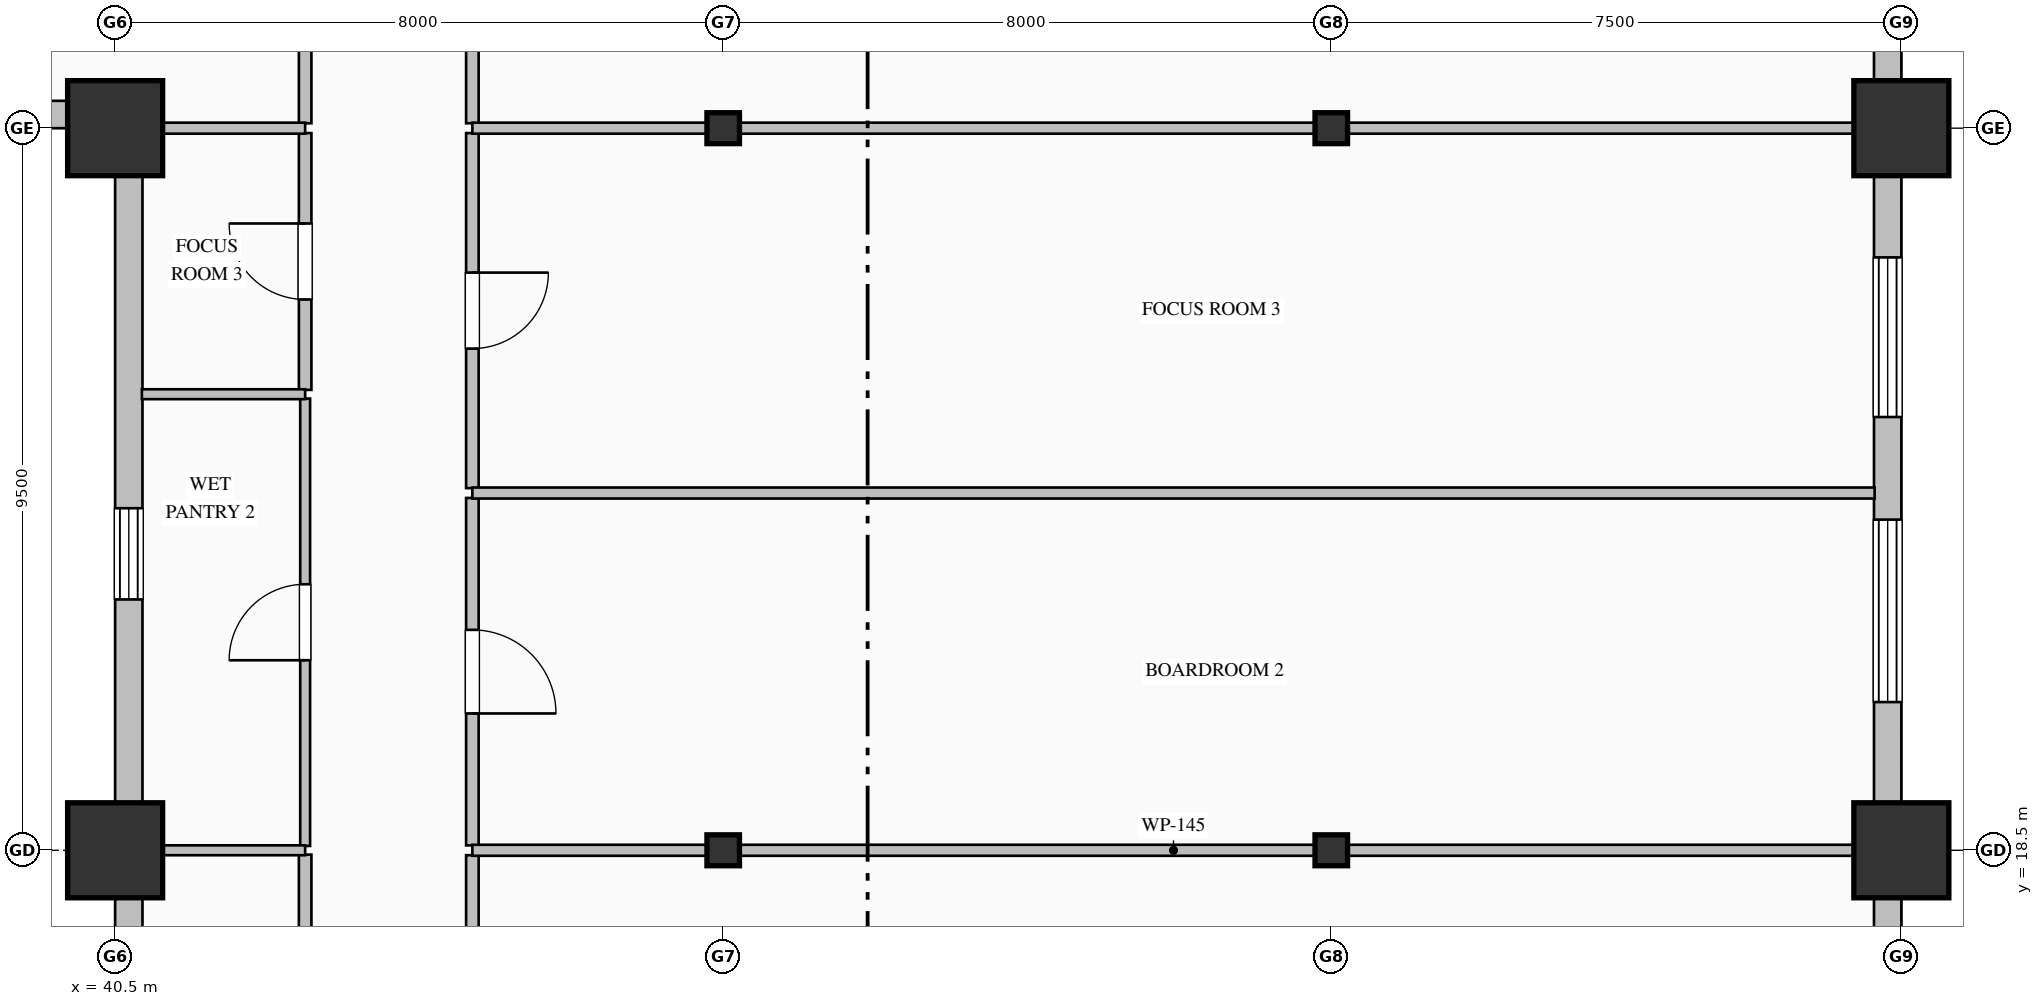
"""IFC4 building model, lengths in metres.
Left out: names, types, materials, properties, quantities, classifications, styles, units other than length and angle.
Written with IfcOpenShell. Run it as: python <this file> out.ifc"""

import sys

from ifc_helpers import new_model, si_unit, direction, frame, frame_2d, origin, origin_2d, place, context, subcontext, project, spatial, rectangle, hollow_rectangle, i_section, extrude, element, fill, save


model = new_model("IFC4")
c1 = context("Model", 3, precision=1e-05, world=origin(), true_north=direction((0.0, 1.0)))
c2 = subcontext(c1, "Body", "Model", "MODEL_VIEW")
j1 = project(units=[si_unit("LENGTHUNIT", "METRE"), si_unit("PLANEANGLEUNIT", "RADIAN")], contexts=[c1])
p1 = place(None, origin())
s1 = spatial("IfcSite", under=j1, at=p1, CompositionType="ELEMENT")
p2 = place(p1, origin())
s2 = spatial("IfcBuilding", under=s1, at=p2, CompositionType="ELEMENT")
p3 = place(p2, frame((0.0, 0.0, 36.2)))
s3 = spatial("IfcBuildingStorey", under=s2, at=p3, CompositionType="ELEMENT", Elevation=36.2)
for number, where, z_axis, x_axis in (
    (1, (40.5, 18.5, 0.0), (0.0, 0.0, 1.0), (1.0, 0.0, 0.0)),
    (2, (40.5, 28.0, 0.0), (0.0, 0.0, 1.0), (1.0, 0.0, 0.0)),
):
    element("IfcColumn", number, at=place(p3, frame(where, z_axis=z_axis, x_axis=x_axis)), inside=s3, PredefinedType="COLUMN", context=c2, shape_type="SweptSolid", body=[
        extrude(hollow_rectangle(XDim=1.25, YDim=1.25, WallThickness=0.045, at=origin_2d()), origin(), (0.0, 0.0, 1.0), 4.0),
    ])
for number, where, z_axis, x_axis in (
    (3, (48.5, 18.5, 0.0), (0.0, 0.0, 1.0), (1.0, 0.0, 0.0)),
    (4, (48.5, 28.0, 0.0), (0.0, 0.0, 1.0), (1.0, 0.0, 0.0)),
    (5, (56.5, 18.5, 0.0), (0.0, 0.0, 1.0), (1.0, 0.0, 0.0)),
    (6, (56.5, 28.0, 0.0), (0.0, 0.0, 1.0), (1.0, 0.0, 0.0)),
):
    element("IfcColumn", number, at=place(p3, frame(where, z_axis=z_axis, x_axis=x_axis)), inside=s3, PredefinedType="COLUMN", context=c2, shape_type="SweptSolid", body=[
        extrude(i_section(OverallWidth=0.407, OverallDepth=0.428, WebThickness=0.02, FlangeThickness=0.035, FilletRadius=0.022, at=origin_2d()), origin(), (0.0, 0.0, 1.0), 4.0),
    ])
for number, where, z_axis, x_axis in (
    (7, (64.0, 18.5, 0.0), (0.0, 0.0, 1.0), (1.0, 0.0, 0.0)),
    (8, (64.0, 28.0, 0.0), (0.0, 0.0, 1.0), (1.0, 0.0, 0.0)),
):
    element("IfcColumn", number, at=place(p3, frame(where, z_axis=z_axis, x_axis=x_axis)), inside=s3, PredefinedType="COLUMN", context=c2, shape_type="SweptSolid", body=[
        extrude(hollow_rectangle(XDim=1.25, YDim=1.25, WallThickness=0.045, at=origin_2d()), origin(), (0.0, 0.0, 1.0), 4.0),
    ])
p4 = place(p3, frame((40.68, 8.0, 0.0), z_axis=(0.0, 0.0, 1.0), x_axis=(0.0, 1.0, 0.0)))
e9 = element("IfcWall", 9, at=p4, inside=s3, PredefinedType="SOLIDWALL", context=c2, shape_type="SweptSolid", body=[
    extrude(rectangle(XDim=20.36, YDim=0.36, at=frame_2d((10.18, 0.0))), origin(), (0.0, 0.0, 1.0), 3.05),
])
p5 = place(p4, frame((6.6, 0.0, 0.7)))
e10 = element("IfcOpeningElement", 10, at=p5, cuts=e9, PredefinedType="OPENING", context=c2, shape_type="SweptSolid", body=[
    extrude(rectangle(XDim=1.2, YDim=1.85, at=frame_2d((0.6, 0.925))), frame((0.0, 0.19, 0.0), z_axis=(0.0, -1.0, 0.0), x_axis=(1.0, 0.0, 0.0)), (0.0, 0.0, 1.0), 0.38),
])
p6 = place(p4, frame((13.8, 0.0, 0.7)))
e11 = element("IfcOpeningElement", 11, at=p6, cuts=e9, PredefinedType="OPENING", context=c2, shape_type="SweptSolid", body=[
    extrude(rectangle(XDim=1.2, YDim=1.85, at=frame_2d((0.6, 0.925))), frame((0.0, 0.19, 0.0), z_axis=(0.0, -1.0, 0.0), x_axis=(1.0, 0.0, 0.0)), (0.0, 0.0, 1.0), 0.38),
])
p7 = place(p3, frame((40.52, 28.18, 0.0), z_axis=(0.0, 0.0, 1.0), x_axis=(-1.0, 0.0, 0.0)))
e12 = element("IfcWall", 12, at=p7, inside=s3, PredefinedType="SOLIDWALL", context=c2, shape_type="SweptSolid", body=[
    extrude(rectangle(XDim=36.52, YDim=0.36, at=frame_2d((18.26, 0.0))), origin(), (0.0, 0.0, 1.0), 3.05),
])
p8 = place(p7, frame((10.2, 0.0, 0.7)))
e13 = element("IfcOpeningElement", 13, at=p8, cuts=e12, PredefinedType="OPENING", context=c2, shape_type="SweptSolid", body=[
    extrude(rectangle(XDim=1.2, YDim=1.85, at=frame_2d((0.6, 0.925))), frame((0.0, 0.19, 0.0), z_axis=(0.0, -1.0, 0.0), x_axis=(1.0, 0.0, 0.0)), (0.0, 0.0, 1.0), 0.38),
])
p9 = place(p7, frame((13.8, 0.0, 0.7)))
e14 = element("IfcOpeningElement", 14, at=p9, cuts=e12, PredefinedType="OPENING", context=c2, shape_type="SweptSolid", body=[
    extrude(rectangle(XDim=1.2, YDim=1.85, at=frame_2d((0.6, 0.925))), frame((0.0, 0.19, 0.0), z_axis=(0.0, -1.0, 0.0), x_axis=(1.0, 0.0, 0.0)), (0.0, 0.0, 1.0), 0.38),
])
p10 = place(p7, frame((17.4, 0.0, 0.7)))
e15 = element("IfcOpeningElement", 15, at=p10, cuts=e12, PredefinedType="OPENING", context=c2, shape_type="SweptSolid", body=[
    extrude(rectangle(XDim=1.2, YDim=1.85, at=frame_2d((0.6, 0.925))), frame((0.0, 0.19, 0.0), z_axis=(0.0, -1.0, 0.0), x_axis=(1.0, 0.0, 0.0)), (0.0, 0.0, 1.0), 0.38),
])
p11 = place(p7, frame((21.0, 0.0, 0.7)))
e16 = element("IfcOpeningElement", 16, at=p11, cuts=e12, PredefinedType="OPENING", context=c2, shape_type="SweptSolid", body=[
    extrude(rectangle(XDim=1.2, YDim=1.85, at=frame_2d((0.6, 0.925))), frame((0.0, 0.19, 0.0), z_axis=(0.0, -1.0, 0.0), x_axis=(1.0, 0.0, 0.0)), (0.0, 0.0, 1.0), 0.38),
])
p12 = place(p7, frame((28.2, 0.0, 0.7)))
e17 = element("IfcOpeningElement", 17, at=p12, cuts=e12, PredefinedType="OPENING", context=c2, shape_type="SweptSolid", body=[
    extrude(rectangle(XDim=1.2, YDim=1.85, at=frame_2d((0.6, 0.925))), frame((0.0, 0.19, 0.0), z_axis=(0.0, -1.0, 0.0), x_axis=(1.0, 0.0, 0.0)), (0.0, 0.0, 1.0), 0.38),
])
p13 = place(p3, frame((63.82, 36.05, 0.0), z_axis=(0.0, 0.0, 1.0), x_axis=(0.0, -1.0, 0.0)))
e18 = element("IfcWall", 18, at=p13, inside=s3, PredefinedType="SOLIDWALL", context=c2, shape_type="SweptSolid", body=[
    extrude(rectangle(XDim=28.05, YDim=0.36, at=frame_2d((14.025, 0.0))), origin(), (0.0, 0.0, 1.0), 3.25),
])
p14 = place(p13, frame((9.75, 0.0, 0.85)))
e19 = element("IfcOpeningElement", 19, at=p14, cuts=e18, PredefinedType="OPENING", context=c2, shape_type="SweptSolid", body=[
    extrude(rectangle(XDim=2.1, YDim=2.05, at=frame_2d((1.05, 1.025))), frame((0.0, 0.19, 0.0), z_axis=(0.0, -1.0, 0.0), x_axis=(1.0, 0.0, 0.0)), (0.0, 0.0, 1.0), 0.38),
])
p15 = place(p13, frame((13.2, 0.0, 0.8)))
e20 = element("IfcOpeningElement", 20, at=p15, cuts=e18, PredefinedType="OPENING", context=c2, shape_type="SweptSolid", body=[
    extrude(rectangle(XDim=2.4, YDim=2.15, at=frame_2d((1.2, 1.075))), frame((0.0, 0.19, 0.0), z_axis=(0.0, -1.0, 0.0), x_axis=(1.0, 0.0, 0.0)), (0.0, 0.0, 1.0), 0.38),
])
p16 = place(p3, frame((45.2, 18.436, 0.0), z_axis=(0.0, 0.0, 1.0), x_axis=(0.0, -1.0, 0.0)))
e21 = element("IfcWall", 21, at=p16, inside=s3, PredefinedType="PARTITIONING", context=c2, shape_type="SweptSolid", body=[
    extrude(rectangle(XDim=3.661, YDim=0.165, at=frame_2d((1.831, 0.0))), origin(), (0.0, 0.0, 1.0), 3.75),
])
p17 = place(p3, frame((45.2, 23.135, 0.0), z_axis=(0.0, 0.0, 1.0), x_axis=(0.0, -1.0, 0.0)))
e22 = element("IfcWall", 22, at=p17, inside=s3, PredefinedType="PARTITIONING", context=c2, shape_type="SweptSolid", body=[
    extrude(rectangle(XDim=4.571, YDim=0.165, at=frame_2d((2.286, 0.0))), origin(), (0.0, 0.0, 1.0), 3.75),
])
p18 = place(p17, frame((1.736, 0.0, 0.0)))
e23 = element("IfcOpeningElement", 23, at=p18, cuts=e22, PredefinedType="OPENING", context=c2, shape_type="SweptSolid", body=[
    extrude(rectangle(XDim=1.1, YDim=2.2, at=frame_2d((0.55, 1.1))), frame((0.0, 0.093, 0.0), z_axis=(0.0, -1.0, 0.0), x_axis=(1.0, 0.0, 0.0)), (0.0, 0.0, 1.0), 0.185),
])
p19 = place(p3, frame((45.2, 27.936, 0.0), z_axis=(0.0, 0.0, 1.0), x_axis=(0.0, -1.0, 0.0)))
e24 = element("IfcWall", 24, at=p19, inside=s3, PredefinedType="PARTITIONING", context=c2, shape_type="SweptSolid", body=[
    extrude(rectangle(XDim=4.671, YDim=0.165, at=frame_2d((2.335, 0.0))), origin(), (0.0, 0.0, 1.0), 3.75),
])
p20 = place(p19, frame((1.835, 0.0, 0.0)))
e25 = element("IfcOpeningElement", 25, at=p20, cuts=e24, PredefinedType="OPENING", context=c2, shape_type="SweptSolid", body=[
    extrude(rectangle(XDim=1.0, YDim=2.15, at=frame_2d((0.5, 1.075))), frame((0.0, 0.093, 0.0), z_axis=(0.0, -1.0, 0.0), x_axis=(1.0, 0.0, 0.0)), (0.0, 0.0, 1.0), 0.185),
])
p21 = place(p3, frame((45.2, 31.525, 0.0), z_axis=(0.0, 0.0, 1.0), x_axis=(0.0, -1.0, 0.0)))
e26 = element("IfcWall", 26, at=p21, inside=s3, PredefinedType="PARTITIONING", context=c2, shape_type="SweptSolid", body=[
    extrude(rectangle(XDim=3.461, YDim=0.165, at=frame_2d((1.73, 0.0))), origin(), (0.0, 0.0, 1.0), 3.75),
])
p22 = place(p3, frame((43.0, 12.574, 0.0), z_axis=(0.0, 0.0, 1.0), x_axis=(0.0, 1.0, 0.0)))
e27 = element("IfcWall", 27, at=p22, inside=s3, PredefinedType="PARTITIONING", context=c2, shape_type="SweptSolid", body=[
    extrude(rectangle(XDim=5.869, YDim=0.165, at=frame_2d((2.934, 0.0))), origin(), (0.0, 0.0, 1.0), 3.75),
])
p23 = place(p22, frame((2.434, 0.0, 0.0)))
e28 = element("IfcOpeningElement", 28, at=p23, cuts=e27, PredefinedType="OPENING", context=c2, shape_type="SweptSolid", body=[
    extrude(rectangle(XDim=1.0, YDim=2.15, at=frame_2d((0.5, 1.075))), frame((0.0, 0.093, 0.0), z_axis=(0.0, -1.0, 0.0), x_axis=(1.0, 0.0, 0.0)), (0.0, 0.0, 1.0), 0.185),
])
p24 = place(p3, frame((43.0, 18.557, 0.0), z_axis=(0.0, 0.0, 1.0), x_axis=(0.0, 1.0, 0.0)))
e29 = element("IfcWall", 29, at=p24, inside=s3, PredefinedType="PARTITIONING", context=c2, shape_type="SweptSolid", body=[
    extrude(rectangle(XDim=5.886, YDim=0.13, at=frame_2d((2.943, 0.0))), origin(), (0.0, 0.0, 1.0), 3.75),
])
p25 = place(p24, frame((2.443, 0.0, 0.0)))
e30 = element("IfcOpeningElement", 30, at=p25, cuts=e29, PredefinedType="OPENING", context=c2, shape_type="SweptSolid", body=[
    extrude(rectangle(XDim=1.0, YDim=2.15, at=frame_2d((0.5, 1.075))), frame((0.0, 0.075, 0.0), z_axis=(0.0, -1.0, 0.0), x_axis=(1.0, 0.0, 0.0)), (0.0, 0.0, 1.0), 0.15),
])
p26 = place(p3, frame((43.0, 24.557, 0.0), z_axis=(0.0, 0.0, 1.0), x_axis=(0.0, 1.0, 0.0)))
e31 = element("IfcWall", 31, at=p26, inside=s3, PredefinedType="PARTITIONING", context=c2, shape_type="SweptSolid", body=[
    extrude(rectangle(XDim=3.379, YDim=0.165, at=frame_2d((1.689, 0.0))), origin(), (0.0, 0.0, 1.0), 3.75),
])
p27 = place(p26, frame((1.189, 0.0, 0.0)))
e32 = element("IfcOpeningElement", 32, at=p27, cuts=e31, PredefinedType="OPENING", context=c2, shape_type="SweptSolid", body=[
    extrude(rectangle(XDim=1.0, YDim=2.15, at=frame_2d((0.5, 1.075))), frame((0.0, 0.093, 0.0), z_axis=(0.0, -1.0, 0.0), x_axis=(1.0, 0.0, 0.0)), (0.0, 0.0, 1.0), 0.185),
])
p28 = place(p3, frame((43.0, 28.064, 0.0), z_axis=(0.0, 0.0, 1.0), x_axis=(0.0, 1.0, 0.0)))
e33 = element("IfcWall", 33, at=p28, inside=s3, PredefinedType="PARTITIONING", context=c2, shape_type="SweptSolid", body=[
    extrude(rectangle(XDim=3.461, YDim=0.165, at=frame_2d((1.73, 0.0))), origin(), (0.0, 0.0, 1.0), 3.75),
])
p29 = place(p28, frame((1.23, 0.0, 0.0)))
e34 = element("IfcOpeningElement", 34, at=p29, cuts=e33, PredefinedType="OPENING", context=c2, shape_type="SweptSolid", body=[
    extrude(rectangle(XDim=1.0, YDim=2.15, at=frame_2d((0.5, 1.075))), frame((0.0, 0.093, 0.0), z_axis=(0.0, -1.0, 0.0), x_axis=(1.0, 0.0, 0.0)), (0.0, 0.0, 1.0), 0.185),
])
p30 = place(p3, frame((45.2, 18.5, 0.0), z_axis=(0.0, 0.0, 1.0), x_axis=(1.0, 0.0, 0.0)))
e35 = element("IfcWall", 35, at=p30, inside=s3, PredefinedType="PARTITIONING", context=c2, shape_type="SweptSolid", body=[
    extrude(rectangle(XDim=18.448, YDim=0.145, at=frame_2d((9.224, 0.0))), origin(), (0.0, 0.0, 1.0), 3.042),
])
p31 = place(p3, frame((45.2, 23.2, 0.0), z_axis=(0.0, 0.0, 1.0), x_axis=(1.0, 0.0, 0.0)))
e36 = element("IfcWall", 36, at=p31, inside=s3, PredefinedType="PARTITIONING", context=c2, shape_type="SweptSolid", body=[
    extrude(rectangle(XDim=18.448, YDim=0.145, at=frame_2d((9.224, 0.0))), origin(), (0.0, 0.0, 1.0), 3.342),
])
p32 = place(p3, frame((45.2, 28.0, 0.0), z_axis=(0.0, 0.0, 1.0), x_axis=(1.0, 0.0, 0.0)))
e37 = element("IfcWall", 37, at=p32, inside=s3, PredefinedType="PARTITIONING", context=c2, shape_type="SweptSolid", body=[
    extrude(rectangle(XDim=18.448, YDim=0.145, at=frame_2d((9.224, 0.0))), origin(), (0.0, 0.0, 1.0), 3.042),
])
p33 = place(p3, frame((40.852, 18.5, 0.0), z_axis=(0.0, 0.0, 1.0), x_axis=(1.0, 0.0, 0.0)))
e38 = element("IfcWall", 38, at=p33, inside=s3, PredefinedType="PARTITIONING", context=c2, shape_type="SweptSolid", body=[
    extrude(rectangle(XDim=2.148, YDim=0.13, at=frame_2d((1.074, 0.0))), origin(), (0.0, 0.0, 1.0), 3.042),
])
p34 = place(p3, frame((40.852, 24.5, 0.0), z_axis=(0.0, 0.0, 1.0), x_axis=(1.0, 0.0, 0.0)))
e39 = element("IfcWall", 39, at=p34, inside=s3, PredefinedType="PARTITIONING", context=c2, shape_type="SweptSolid", body=[
    extrude(rectangle(XDim=2.148, YDim=0.13, at=frame_2d((1.074, 0.0))), origin(), (0.0, 0.0, 1.0), 3.75),
])
p35 = place(p3, frame((40.852, 28.0, 0.0), z_axis=(0.0, 0.0, 1.0), x_axis=(1.0, 0.0, 0.0)))
e40 = element("IfcWall", 40, at=p35, inside=s3, PredefinedType="PARTITIONING", context=c2, shape_type="SweptSolid", body=[
    extrude(rectangle(XDim=2.148, YDim=0.145, at=frame_2d((1.074, 0.0))), origin(), (0.0, 0.0, 1.0), 3.042),
])
p36 = place(p6, origin())
e41 = element("IfcWindow", 41, at=p36, inside=s3, PartitioningType="DOUBLE_PANEL_VERTICAL", PredefinedType="WINDOW", context=c2, shape_type="SweptSolid", body=[
    extrude(rectangle(XDim=1.2, YDim=1.85, at=frame_2d((0.6, 0.925))), frame((0.0, 0.15, 0.0), z_axis=(0.0, -1.0, 0.0), x_axis=(1.0, 0.0, 0.0)), (0.0, 0.0, 1.0), 0.06),
])
fill(e11, e41)
p37 = place(p14, origin())
e42 = element("IfcWindow", 42, at=p37, inside=s3, PartitioningType="TRIPLE_PANEL_VERTICAL", PredefinedType="WINDOW", context=c2, shape_type="SweptSolid", body=[
    extrude(rectangle(XDim=2.1, YDim=2.05, at=frame_2d((1.05, 1.025))), frame((0.0, 0.15, 0.0), z_axis=(0.0, -1.0, 0.0), x_axis=(1.0, 0.0, 0.0)), (0.0, 0.0, 1.0), 0.06),
])
fill(e19, e42)
p38 = place(p15, origin())
e43 = element("IfcWindow", 43, at=p38, inside=s3, PartitioningType="TRIPLE_PANEL_VERTICAL", PredefinedType="WINDOW", context=c2, shape_type="SweptSolid", body=[
    extrude(rectangle(XDim=2.4, YDim=2.15, at=frame_2d((1.2, 1.075))), frame((0.0, 0.15, 0.0), z_axis=(0.0, -1.0, 0.0), x_axis=(1.0, 0.0, 0.0)), (0.0, 0.0, 1.0), 0.06),
])
fill(e20, e43)
p39 = place(p18, origin())
e44 = element("IfcDoor", 44, at=p39, inside=s3, OperationType="SINGLE_SWING_RIGHT", PredefinedType="DOOR", context=c2, shape_type="SweptSolid", body=[
    extrude(rectangle(XDim=1.1, YDim=2.2, at=frame_2d((0.55, 1.1))), frame((0.0, 0.025, 0.0), z_axis=(0.0, -1.0, 0.0), x_axis=(1.0, 0.0, 0.0)), (0.0, 0.0, 1.0), 0.05),
])
fill(e23, e44)
p40 = place(p20, origin())
e45 = element("IfcDoor", 45, at=p40, inside=s3, OperationType="SINGLE_SWING_LEFT", PredefinedType="DOOR", context=c2, shape_type="SweptSolid", body=[
    extrude(rectangle(XDim=1.0, YDim=2.15, at=frame_2d((0.5, 1.075))), frame((0.0, 0.025, 0.0), z_axis=(0.0, -1.0, 0.0), x_axis=(1.0, 0.0, 0.0)), (0.0, 0.0, 1.0), 0.05),
])
fill(e25, e45)
p41 = place(p25, origin())
e46 = element("IfcDoor", 46, at=p41, inside=s3, OperationType="SINGLE_SWING_LEFT", PredefinedType="DOOR", context=c2, shape_type="SweptSolid", body=[
    extrude(rectangle(XDim=1.0, YDim=2.15, at=frame_2d((0.5, 1.075))), frame((0.0, 0.025, 0.0), z_axis=(0.0, -1.0, 0.0), x_axis=(1.0, 0.0, 0.0)), (0.0, 0.0, 1.0), 0.05),
])
fill(e30, e46)
p42 = place(p27, origin())
e47 = element("IfcDoor", 47, at=p42, inside=s3, OperationType="SINGLE_SWING_RIGHT", PredefinedType="DOOR", context=c2, shape_type="SweptSolid", body=[
    extrude(rectangle(XDim=1.0, YDim=2.15, at=frame_2d((0.5, 1.075))), frame((0.0, 0.025, 0.0), z_axis=(0.0, -1.0, 0.0), x_axis=(1.0, 0.0, 0.0)), (0.0, 0.0, 1.0), 0.05),
])
fill(e32, e47)
save(model, sys.argv[1])
